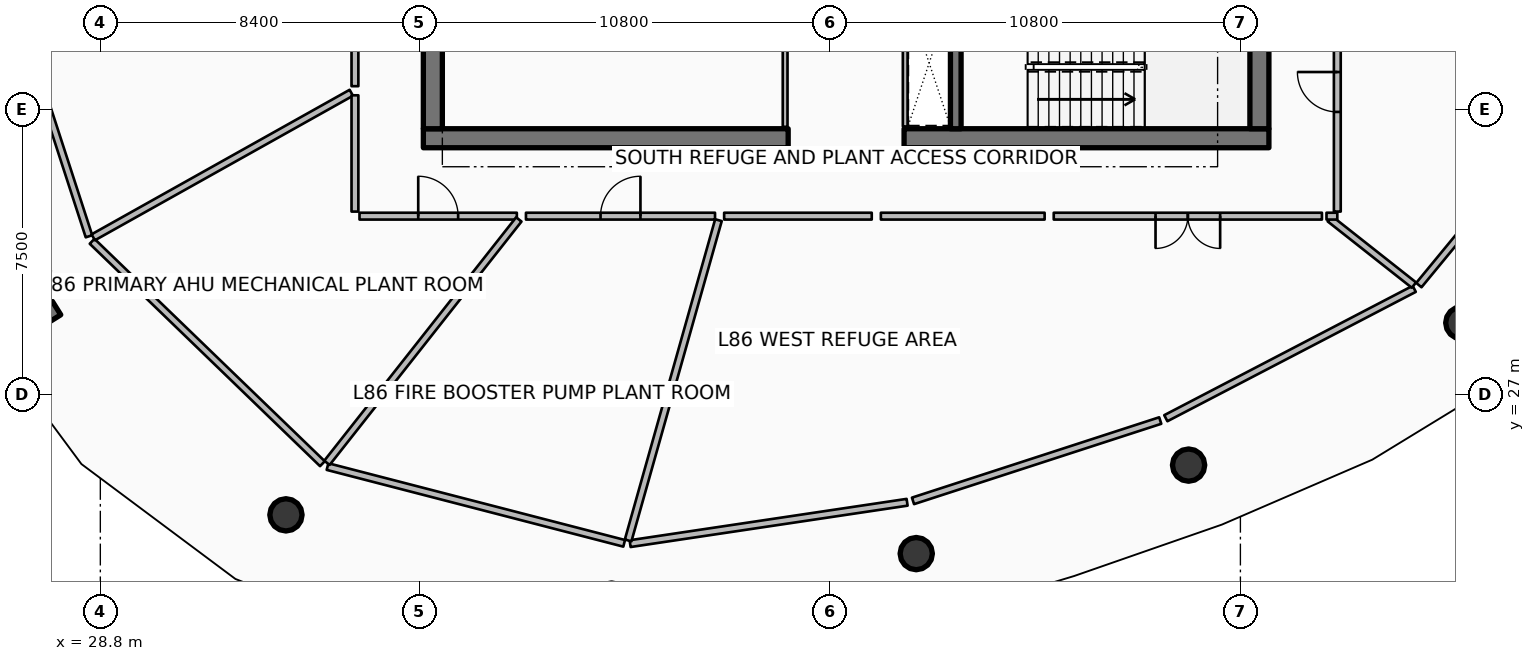
"""IFC4 building model, lengths in metres.
Left out: names, types, materials, properties, quantities, classifications, styles, units other than length and angle.
Written with IfcOpenShell. Run it as: python <this file> out.ifc"""

import sys

from ifc_helpers import new_model, si_unit, direction, frame, frame_2d, origin, origin_2d, place, context, subcontext, project, spatial, rectangle, circle, extrude, element, fill, save


model = new_model("IFC4")
c1 = context("Model", 3, precision=1e-05, world=origin(), true_north=direction((0.0, 1.0)))
c2 = subcontext(c1, "Body", "Model", "MODEL_VIEW")
j1 = project(units=[si_unit("LENGTHUNIT", "METRE"), si_unit("PLANEANGLEUNIT", "RADIAN")], contexts=[c1])
p1 = place(None, origin())
s1 = spatial("IfcSite", under=j1, at=p1, CompositionType="ELEMENT")
p2 = place(p1, origin())
s2 = spatial("IfcBuilding", under=s1, at=p2, CompositionType="ELEMENT")
p3 = place(p2, frame((0.0, 0.0, 343.1)))
s3 = spatial("IfcBuildingStorey", under=s2, at=p3, CompositionType="ELEMENT", Elevation=343.1)
p4 = place(p3, frame((37.3, 33.75, 0.0), z_axis=(0.0, 0.0, 1.0), x_axis=(1.0, 0.0, 0.0)))
e1 = element("IfcWall", 1, at=p4, inside=s3, PredefinedType="SHEAR", context=c2, shape_type="SweptSolid", body=[
    extrude(rectangle(XDim=9.6, YDim=0.5, at=frame_2d((4.8, 0.0))), origin(), (0.0, 0.0, 1.0), 4.2),
])
p5 = place(p3, frame((49.95, 33.75, 0.0), z_axis=(0.0, 0.0, 1.0), x_axis=(1.0, 0.0, 0.0)))
e2 = element("IfcWall", 2, at=p5, inside=s3, PredefinedType="SHEAR", context=c2, shape_type="SweptSolid", body=[
    extrude(rectangle(XDim=9.6, YDim=0.5, at=frame_2d((4.8, 0.0))), origin(), (0.0, 0.0, 1.0), 4.2),
])
for number, where, z_axis, x_axis in (
    (3, (37.55, 34.0, 0.0), (0.0, 0.0, 1.0), (0.0, 1.0, 0.0)),
    (4, (59.3, 34.0, 0.0), (0.0, 0.0, 1.0), (0.0, 1.0, 0.0)),
):
    element("IfcWall", number, at=place(p3, frame(where, z_axis=z_axis, x_axis=x_axis)), inside=s3, PredefinedType="SHEAR", context=c2, shape_type="SweptSolid", body=[
        extrude(rectangle(XDim=16.0, YDim=0.5, at=frame_2d((8.0, 0.0))), origin(), (0.0, 0.0, 1.0), 4.2),
    ])
p6 = place(p3, frame((51.31, 34.0, 0.0), z_axis=(0.0, 0.0, 1.0), x_axis=(0.0, 1.0, 0.0)))
e5 = element("IfcWall", 5, at=p6, inside=s3, PredefinedType="SHEAR", context=c2, shape_type="SweptSolid", body=[
    extrude(rectangle(XDim=3.5, YDim=0.28, at=frame_2d((1.75, 0.0))), origin(), (0.0, 0.0, 1.0), 4.2),
])
p7 = place(p3, frame((27.647, 29.282, 0.0), z_axis=(0.0, 0.0, 1.0), x_axis=(-0.848053161125, -0.529911158502, 0.0)))
e6 = element("IfcWall", 6, at=p7, inside=s3, PredefinedType="SOLIDWALL", context=c2, shape_type="SweptSolid", body=[
    extrude(rectangle(XDim=3.5, YDim=0.42, at=frame_2d((1.75, 0.0))), origin(), (0.0, 0.0, 1.0), 4.2),
])
for number, where, z_axis, x_axis in (
    (7, (33.684, 23.841, 0.0), (0.0, 0.0, 1.0), (1.0, 0.0, 0.0)),
    (8, (50.27, 22.821, 0.0), (0.0, 0.0, 1.0), (1.0, 0.0, 0.0)),
    (9, (57.437, 25.149, 0.0), (0.0, 0.0, 1.0), (1.0, 0.0, 0.0)),
    (10, (64.626, 28.893, 0.0), (0.0, 0.0, 1.0), (1.0, 0.0, 0.0)),
):
    element("IfcColumn", number, at=place(p3, frame(where, z_axis=z_axis, x_axis=x_axis)), inside=s3, PredefinedType="COLUMN", context=c2, shape_type="SweptSolid", body=[
        extrude(circle(Radius=0.425, at=origin_2d()), origin(), (0.0, 0.0, 1.0), 3.94),
    ])
p8 = place(p3, frame((46.82, 34.05, 0.0), z_axis=(0.0, 0.0, 1.0), x_axis=(0.0, 1.0, 0.0)))
e11 = element("IfcWall", 11, at=p8, inside=s3, PredefinedType="PARTITIONING", context=c2, shape_type="SweptSolid", body=[
    extrude(rectangle(XDim=2.03, YDim=0.125, at=frame_2d((1.015, 0.0))), origin(), (0.0, 0.0, 1.0), 3.38),
])
p9 = place(p3, frame((49.98, 34.06, 0.0), z_axis=(0.0, 0.0, 1.0), x_axis=(0.0, 1.0, 0.0)))
e12 = element("IfcWall", 12, at=p9, inside=s3, PredefinedType="PARTITIONING", context=c2, shape_type="SweptSolid", body=[
    extrude(rectangle(XDim=3.4, YDim=0.125, at=frame_2d((1.7, 0.0))), origin(), (0.0, 0.0, 1.0), 3.38),
])
p10 = place(p3, frame((25.859, 39.301, 0.0), z_axis=(0.0, 0.0, 1.0), x_axis=(0.309030537088, -0.951052115894, 0.0)))
e13 = element("IfcWall", 13, at=p10, inside=s3, PredefinedType="PARTITIONING", context=c2, shape_type="SweptSolid", body=[
    extrude(rectangle(XDim=8.549, YDim=0.18, at=frame_2d((4.274, 0.0))), origin(), (0.0, 0.0, 1.0), 2.933),
])
p11 = place(p3, frame((28.583, 31.038, 0.0), z_axis=(0.0, 0.0, 1.0), x_axis=(0.719358516059, -0.694638989241, 0.0)))
e14 = element("IfcWall", 14, at=p11, inside=s3, PredefinedType="PARTITIONING", context=c2, shape_type="SweptSolid", body=[
    extrude(rectangle(XDim=8.425, YDim=0.18, at=frame_2d((4.212, 0.0))), origin(), (0.0, 0.0, 1.0), 2.933),
])
p12 = place(p3, frame((34.779, 25.111, 0.0), z_axis=(0.0, 0.0, 1.0), x_axis=(0.96812020229, -0.250486075298, 0.0)))
e15 = element("IfcWall", 15, at=p12, inside=s3, PredefinedType="PARTITIONING", context=c2, shape_type="SweptSolid", body=[
    extrude(rectangle(XDim=8.062, YDim=0.18, at=frame_2d((4.031, 0.0))), origin(), (0.0, 0.0, 1.0), 2.933),
])
p13 = place(p3, frame((42.74, 23.083, 0.0), z_axis=(0.0, 0.0, 1.0), x_axis=(0.989035992024, 0.147674664315, 0.0)))
e16 = element("IfcWall", 16, at=p13, inside=s3, PredefinedType="PARTITIONING", context=c2, shape_type="SweptSolid", body=[
    extrude(rectangle(XDim=7.37, YDim=0.18, at=frame_2d((3.685, 0.0))), origin(), (0.0, 0.0, 1.0), 2.933),
])
p14 = place(p3, frame((50.185, 24.208, 0.0), z_axis=(0.0, 0.0, 1.0), x_axis=(0.95105793387, 0.309012631495, 0.0)))
e17 = element("IfcWall", 17, at=p14, inside=s3, PredefinedType="PARTITIONING", context=c2, shape_type="SweptSolid", body=[
    extrude(rectangle(XDim=6.84, YDim=0.18, at=frame_2d((3.42, 0.0))), origin(), (0.0, 0.0, 1.0), 2.933),
])
p15 = place(p3, frame((56.837, 26.383, 0.0), z_axis=(0.0, 0.0, 1.0), x_axis=(0.886951970108, 0.461861670548, 0.0)))
e18 = element("IfcWall", 18, at=p15, inside=s3, PredefinedType="PARTITIONING", context=c2, shape_type="SweptSolid", body=[
    extrude(rectangle(XDim=7.37, YDim=0.18, at=frame_2d((3.685, 0.0))), origin(), (0.0, 0.0, 1.0), 2.933),
])
p16 = place(p3, frame((63.496, 29.886, 0.0), z_axis=(0.0, 0.0, 1.0), x_axis=(0.635999094609, 0.771689802743, 0.0)))
e19 = element("IfcWall", 19, at=p16, inside=s3, PredefinedType="PARTITIONING", context=c2, shape_type="SweptSolid", body=[
    extrude(rectangle(XDim=8.062, YDim=0.18, at=frame_2d((4.031, 0.0))), origin(), (0.0, 0.0, 1.0), 2.933),
])
p17 = place(p3, frame((35.5, 40.4, 0.0), z_axis=(0.0, 0.0, 1.0), x_axis=(0.0, -1.0, 0.0)))
e20 = element("IfcWall", 20, at=p17, inside=s3, PredefinedType="PARTITIONING", context=c2, shape_type="SweptSolid", body=[
    extrude(rectangle(XDim=5.281, YDim=0.18, at=frame_2d((2.64, 0.0))), origin(), (0.0, 0.0, 1.0), 2.933),
])
p18 = place(p17, frame((1.79, 0.0, 0.0)))
e21 = element("IfcOpeningElement", 21, at=p18, cuts=e20, PredefinedType="OPENING", context=c2, shape_type="SweptSolid", body=[
    extrude(rectangle(XDim=1.7, YDim=2.15, at=frame_2d((0.85, 1.075))), frame((0.0, 0.1, 0.0), z_axis=(0.0, -1.0, 0.0), x_axis=(1.0, 0.0, 0.0)), (0.0, 0.0, 1.0), 0.2),
])
p19 = place(p3, frame((35.404, 34.946, 0.0), z_axis=(0.0, 0.0, 1.0), x_axis=(-0.872492108865, -0.488628202182, 0.0)))
e22 = element("IfcWall", 22, at=p19, inside=s3, PredefinedType="PARTITIONING", context=c2, shape_type="SweptSolid", body=[
    extrude(rectangle(XDim=7.783, YDim=0.18, at=frame_2d((3.892, 0.0))), origin(), (0.0, 0.0, 1.0), 2.933),
])
p20 = place(p3, frame((35.5, 34.88, 0.0), z_axis=(0.0, 0.0, 1.0), x_axis=(0.0, -1.0, 0.0)))
e23 = element("IfcWall", 23, at=p20, inside=s3, PredefinedType="PARTITIONING", context=c2, shape_type="SweptSolid", body=[
    extrude(rectangle(XDim=3.06, YDim=0.18, at=frame_2d((1.53, 0.0))), origin(), (0.0, 0.0, 1.0), 2.933),
])
p21 = place(p3, frame((35.62, 31.7, 0.0), z_axis=(0.0, 0.0, 1.0), x_axis=(1.0, 0.0, 0.0)))
e24 = element("IfcWall", 24, at=p21, inside=s3, PredefinedType="PARTITIONING", context=c2, shape_type="SweptSolid", body=[
    extrude(rectangle(XDim=4.14, YDim=0.18, at=frame_2d((2.07, 0.0))), origin(), (0.0, 0.0, 1.0), 2.933),
])
p22 = place(p21, frame((1.545, 0.0, 0.0)))
e25 = element("IfcOpeningElement", 25, at=p22, cuts=e24, PredefinedType="OPENING", context=c2, shape_type="SweptSolid", body=[
    extrude(rectangle(XDim=1.05, YDim=2.1, at=frame_2d((0.525, 1.05))), frame((0.0, 0.1, 0.0), z_axis=(0.0, -1.0, 0.0), x_axis=(1.0, 0.0, 0.0)), (0.0, 0.0, 1.0), 0.2),
])
p23 = place(p3, frame((39.812, 31.614, 0.0), z_axis=(0.0, 0.0, 1.0), x_axis=(-0.619086016157, -0.785323184809, 0.0)))
e26 = element("IfcWall", 26, at=p23, inside=s3, PredefinedType="PARTITIONING", context=c2, shape_type="SweptSolid", body=[
    extrude(rectangle(XDim=8.155, YDim=0.18, at=frame_2d((4.078, 0.0))), origin(), (0.0, 0.0, 1.0), 2.933),
])
p24 = place(p3, frame((40.0, 31.7, 0.0), z_axis=(0.0, 0.0, 1.0), x_axis=(1.0, 0.0, 0.0)))
e27 = element("IfcWall", 27, at=p24, inside=s3, PredefinedType="PARTITIONING", context=c2, shape_type="SweptSolid", body=[
    extrude(rectangle(XDim=4.975, YDim=0.18, at=frame_2d((2.488, 0.0))), origin(), (0.0, 0.0, 1.0), 2.933),
])
p25 = place(p24, frame((1.962, 0.0, 0.0)))
e28 = element("IfcOpeningElement", 28, at=p25, cuts=e27, PredefinedType="OPENING", context=c2, shape_type="SweptSolid", body=[
    extrude(rectangle(XDim=1.05, YDim=2.1, at=frame_2d((0.525, 1.05))), frame((0.0, 0.1, 0.0), z_axis=(0.0, -1.0, 0.0), x_axis=(1.0, 0.0, 0.0)), (0.0, 0.0, 1.0), 0.2),
])
p26 = place(p3, frame((45.065, 31.594, 0.0), z_axis=(0.0, 0.0, 1.0), x_axis=(-0.271427049977, -0.962459015512, 0.0)))
e29 = element("IfcWall", 29, at=p26, inside=s3, PredefinedType="PARTITIONING", context=c2, shape_type="SweptSolid", body=[
    extrude(rectangle(XDim=8.755, YDim=0.18, at=frame_2d((4.378, 0.0))), origin(), (0.0, 0.0, 1.0), 2.933),
])
p27 = place(p3, frame((45.215, 31.7, 0.0), z_axis=(0.0, 0.0, 1.0), x_axis=(1.0, 0.0, 0.0)))
e30 = element("IfcWall", 30, at=p27, inside=s3, PredefinedType="PARTITIONING", context=c2, shape_type="SweptSolid", body=[
    extrude(rectangle(XDim=3.884, YDim=0.18, at=frame_2d((1.942, 0.0))), origin(), (0.0, 0.0, 1.0), 2.933),
])
p28 = place(p3, frame((49.339, 31.7, 0.0), z_axis=(0.0, 0.0, 1.0), x_axis=(1.0, 0.0, 0.0)))
e31 = element("IfcWall", 31, at=p28, inside=s3, PredefinedType="PARTITIONING", context=c2, shape_type="SweptSolid", body=[
    extrude(rectangle(XDim=4.309, YDim=0.18, at=frame_2d((2.155, 0.0))), origin(), (0.0, 0.0, 1.0), 2.933),
])
p29 = place(p3, frame((53.888, 31.7, 0.0), z_axis=(0.0, 0.0, 1.0), x_axis=(1.0, 0.0, 0.0)))
e32 = element("IfcWall", 32, at=p29, inside=s3, PredefinedType="PARTITIONING", context=c2, shape_type="SweptSolid", body=[
    extrude(rectangle(XDim=7.057, YDim=0.18, at=frame_2d((3.529, 0.0))), origin(), (0.0, 0.0, 1.0), 2.933),
])
p30 = place(p29, frame((2.679, 0.0, 0.0)))
e33 = element("IfcOpeningElement", 33, at=p30, cuts=e32, PredefinedType="OPENING", context=c2, shape_type="SweptSolid", body=[
    extrude(rectangle(XDim=1.7, YDim=2.15, at=frame_2d((0.85, 1.075))), frame((0.0, 0.1, 0.0), z_axis=(0.0, -1.0, 0.0), x_axis=(1.0, 0.0, 0.0)), (0.0, 0.0, 1.0), 0.2),
])
p31 = place(p3, frame((61.152, 31.632, 0.0), z_axis=(0.0, 0.0, 1.0), x_axis=(0.785350101028, -0.619051870861, 0.0)))
e34 = element("IfcWall", 34, at=p31, inside=s3, PredefinedType="PARTITIONING", context=c2, shape_type="SweptSolid", body=[
    extrude(rectangle(XDim=2.82, YDim=0.18, at=frame_2d((1.41, 0.0))), origin(), (0.0, 0.0, 1.0), 2.933),
])
p32 = place(p3, frame((61.065, 31.7, 0.0), z_axis=(0.0, 0.0, 1.0), x_axis=(1.0, 0.0, 0.0)))
e35 = element("IfcWall", 35, at=p32, inside=s3, PredefinedType="PARTITIONING", context=c2, shape_type="SweptSolid", body=[
    extrude(rectangle(XDim=0.285, YDim=0.18, at=frame_2d((0.142, 0.0))), origin(), (0.0, 0.0, 1.0), 2.933),
])
p33 = place(p3, frame((61.35, 31.82, 0.0), z_axis=(0.0, 0.0, 1.0), x_axis=(0.0, 1.0, 0.0)))
e36 = element("IfcWall", 36, at=p33, inside=s3, PredefinedType="PARTITIONING", context=c2, shape_type="SweptSolid", body=[
    extrude(rectangle(XDim=6.295, YDim=0.18, at=frame_2d((3.147, 0.0))), origin(), (0.0, 0.0, 1.0), 2.933),
])
p34 = place(p33, frame((2.622, 0.0, 0.0)))
e37 = element("IfcOpeningElement", 37, at=p34, cuts=e36, PredefinedType="OPENING", context=c2, shape_type="SweptSolid", body=[
    extrude(rectangle(XDim=1.05, YDim=2.1, at=frame_2d((0.525, 1.05))), frame((0.0, 0.1, 0.0), z_axis=(0.0, -1.0, 0.0), x_axis=(1.0, 0.0, 0.0)), (0.0, 0.0, 1.0), 0.2),
])
p35 = place(p22, origin())
e38 = element("IfcDoor", 38, at=p35, inside=s3, OperationType="SINGLE_SWING_LEFT", PredefinedType="DOOR", context=c2, shape_type="SweptSolid", body=[
    extrude(rectangle(XDim=1.05, YDim=2.1, at=frame_2d((0.525, 1.05))), frame((0.0, 0.025, 0.0), z_axis=(0.0, -1.0, 0.0), x_axis=(1.0, 0.0, 0.0)), (0.0, 0.0, 1.0), 0.05),
])
fill(e25, e38)
p36 = place(p25, origin())
e39 = element("IfcDoor", 39, at=p36, inside=s3, OperationType="SINGLE_SWING_RIGHT", PredefinedType="DOOR", context=c2, shape_type="SweptSolid", body=[
    extrude(rectangle(XDim=1.05, YDim=2.1, at=frame_2d((0.525, 1.05))), frame((0.0, 0.025, 0.0), z_axis=(0.0, -1.0, 0.0), x_axis=(1.0, 0.0, 0.0)), (0.0, 0.0, 1.0), 0.05),
])
fill(e28, e39)
p37 = place(p30, origin())
e40 = element("IfcDoor", 40, at=p37, inside=s3, OperationType="DOUBLE_DOOR_SINGLE_SWING", PredefinedType="DOOR", context=c2, shape_type="SweptSolid", body=[
    extrude(rectangle(XDim=1.7, YDim=2.15, at=frame_2d((0.85, 1.075))), frame((0.0, 0.025, 0.0), z_axis=(0.0, -1.0, 0.0), x_axis=(1.0, 0.0, 0.0)), (0.0, 0.0, 1.0), 0.05),
])
fill(e33, e40)
p38 = place(p34, origin())
e41 = element("IfcDoor", 41, at=p38, inside=s3, OperationType="SINGLE_SWING_RIGHT", PredefinedType="DOOR", context=c2, shape_type="SweptSolid", body=[
    extrude(rectangle(XDim=1.05, YDim=2.1, at=frame_2d((0.525, 1.05))), frame((0.0, 0.025, 0.0), z_axis=(0.0, -1.0, 0.0), x_axis=(1.0, 0.0, 0.0)), (0.0, 0.0, 1.0), 0.05),
])
fill(e37, e41)
save(model, sys.argv[1])
